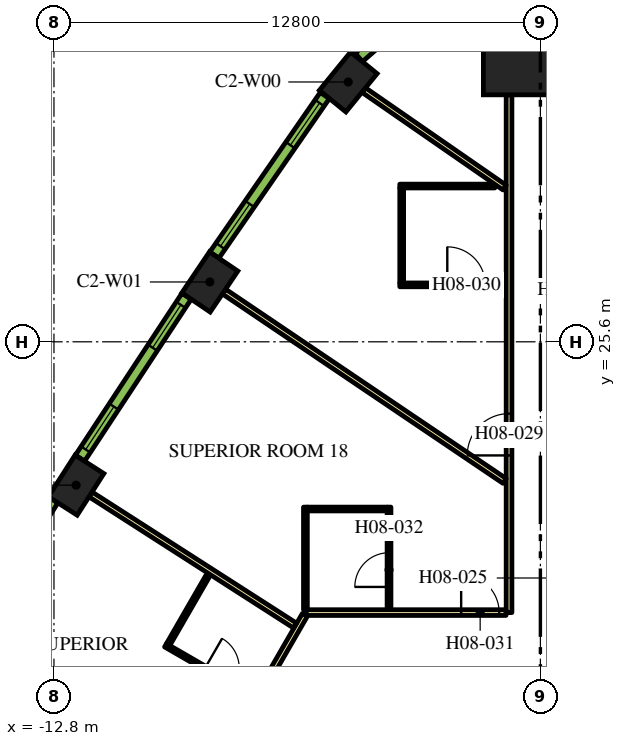
"""IFC4 building model, lengths in metres.
Left out: names, types, materials, properties, quantities, classifications, styles, units other than length and angle.
Written with IfcOpenShell. Run it as: python <this file> out.ifc"""

import sys

from ifc_helpers import new_model, si_unit, direction, frame, frame_2d, origin, origin_2d, place, context, subcontext, project, spatial, rectangle, extrude, element, fill, save


model = new_model("IFC4")
c1 = context("Model", 3, precision=1e-05, world=origin(), true_north=direction((0.0, 1.0)))
c2 = subcontext(c1, "Body", "Model", "MODEL_VIEW")
j1 = project(units=[si_unit("LENGTHUNIT", "METRE"), si_unit("PLANEANGLEUNIT", "RADIAN")], contexts=[c1])
p1 = place(None, origin())
s1 = spatial("IfcSite", under=j1, at=p1, CompositionType="ELEMENT")
p2 = place(p1, origin())
s2 = spatial("IfcBuilding", under=s1, at=p2, CompositionType="ELEMENT")
p3 = place(p2, frame((0.0, 0.0, 107.1)))
s3 = spatial("IfcBuildingStorey", under=s2, at=p3, CompositionType="ELEMENT", Elevation=107.1)
p4 = place(p3, frame((0.0, 33.598, 0.0), z_axis=(0.0, 0.0, 1.0), x_axis=(0.0, 1.0, 0.0)))
e1 = element("IfcColumn", 1, at=p4, inside=s3, PredefinedType="COLUMN", context=c2, shape_type="SweptSolid", body=[
    extrude(rectangle(XDim=3.0, YDim=3.0, at=origin_2d()), origin(), (0.0, 0.0, 1.0), 3.9),
])
for number, where, z_axis, x_axis in (
    (2, (-5.056, 32.437, 0.0), (0.0, 0.0, 1.0), (-0.632, -0.775, 0.0)),
    (3, (-8.699, 27.174, 0.0), (0.0, 0.0, 1.0), (-0.559, -0.829, 0.0)),
    (4, (-12.217, 21.828, 0.0), (0.0, 0.0, 1.0), (-0.54, -0.842, 0.0)),
):
    element("IfcColumn", number, at=place(p3, frame(where, z_axis=z_axis, x_axis=x_axis)), inside=s3, PredefinedType="COLUMN", context=c2, shape_type="SweptSolid", body=[
        extrude(rectangle(XDim=1.3, YDim=0.9, at=origin_2d()), origin(), (0.0, 0.0, 1.0), 3.9),
    ])
p5 = place(p3, frame((-0.825, 18.475, 0.0), z_axis=(0.0, 0.0, 1.0), x_axis=(0.0, 1.0, 0.0)))
e5 = element("IfcWall", 5, at=p5, inside=s3, PredefinedType="PARTITIONING", context=c2, shape_type="SweptSolid", body=[
    extrude(rectangle(XDim=13.623, YDim=0.15, at=frame_2d((6.812, 0.0))), origin(), (0.0, 0.0, 1.0), 2.75),
])
p6 = place(p5, frame((4.135, 0.0, 0.0)))
e6 = element("IfcOpeningElement", 6, at=p6, cuts=e5, PredefinedType="OPENING", context=c2, shape_type="SweptSolid", body=[
    extrude(rectangle(XDim=1.1, YDim=2.1, at=frame_2d((0.55, 1.05))), frame((0.0, 0.085, 0.0), z_axis=(0.0, -1.0, 0.0), x_axis=(1.0, 0.0, 0.0)), (0.0, 0.0, 1.0), 0.17),
])
p7 = place(p3, frame((-6.163, 18.475, 0.0), z_axis=(0.0, 0.0, 1.0), x_axis=(1.0, 0.0, 0.0)))
e7 = element("IfcWall", 7, at=p7, inside=s3, PredefinedType="PARTITIONING", context=c2, shape_type="SweptSolid", body=[
    extrude(rectangle(XDim=5.258, YDim=0.15, at=frame_2d((2.629, 0.0))), origin(), (0.0, 0.0, 1.0), 2.75),
])
p8 = place(p7, frame((4.078, 0.0, 0.0)))
e8 = element("IfcOpeningElement", 8, at=p8, cuts=e7, PredefinedType="OPENING", context=c2, shape_type="SweptSolid", body=[
    extrude(rectangle(XDim=1.0, YDim=2.1, at=frame_2d((0.5, 1.05))), frame((0.0, 0.085, 0.0), z_axis=(0.0, -1.0, 0.0), x_axis=(1.0, 0.0, 0.0)), (0.0, 0.0, 1.0), 0.17),
])
p9 = place(p3, frame((-19.081, -3.9, 0.0), z_axis=(0.0, 0.0, 1.0), x_axis=(0.499998313975, 0.866026377209, 0.0)))
e9 = element("IfcWall", 9, at=p9, inside=s3, PredefinedType="PARTITIONING", context=c2, shape_type="SweptSolid", body=[
    extrude(rectangle(XDim=25.766, YDim=0.15, at=frame_2d((12.883, 0.0))), origin(), (0.0, 0.0, 1.0), 2.75),
])
p10 = place(p9, frame((19.306, 0.0, 0.0)))
e10 = element("IfcOpeningElement", 10, at=p10, cuts=e9, PredefinedType="OPENING", context=c2, shape_type="SweptSolid", body=[
    extrude(rectangle(XDim=1.0, YDim=2.1, at=frame_2d((0.5, 1.05))), frame((0.0, 0.085, 0.0), z_axis=(0.0, -1.0, 0.0), x_axis=(1.0, 0.0, 0.0)), (0.0, 0.0, 1.0), 0.17),
])
p11 = place(p9, frame((18.0, 0.0, 0.0)))
e11 = element("IfcOpeningElement", 11, at=p11, cuts=e9, PredefinedType="OPENING", context=c2, shape_type="SweptSolid", body=[
    extrude(rectangle(XDim=1.0, YDim=2.1, at=frame_2d((0.5, 1.05))), frame((0.0, 0.085, 0.0), z_axis=(0.0, -1.0, 0.0), x_axis=(1.0, 0.0, 0.0)), (0.0, 0.0, 1.0), 0.17),
])
p12 = place(p9, frame((6.838, 0.0, 0.0)))
e12 = element("IfcOpeningElement", 12, at=p12, cuts=e9, PredefinedType="OPENING", context=c2, shape_type="SweptSolid", body=[
    extrude(rectangle(XDim=1.0, YDim=2.1, at=frame_2d((0.5, 1.05))), frame((0.0, 0.085, 0.0), z_axis=(0.0, -1.0, 0.0), x_axis=(1.0, 0.0, 0.0)), (0.0, 0.0, 1.0), 0.17),
])
p13 = place(p9, frame((4.674, 0.0, 0.0)))
e13 = element("IfcOpeningElement", 13, at=p13, cuts=e9, PredefinedType="OPENING", context=c2, shape_type="SweptSolid", body=[
    extrude(rectangle(XDim=0.9, YDim=2.1, at=frame_2d((0.45, 1.05))), frame((0.0, 0.085, 0.0), z_axis=(0.0, -1.0, 0.0), x_axis=(1.0, 0.0, 0.0)), (0.0, 0.0, 1.0), 0.17),
])
p14 = place(p9, frame((0.18, 0.0, 0.0)))
e14 = element("IfcOpeningElement", 14, at=p14, cuts=e9, PredefinedType="OPENING", context=c2, shape_type="SweptSolid", body=[
    extrude(rectangle(XDim=1.0, YDim=2.1, at=frame_2d((0.5, 1.05))), frame((0.0, 0.085, 0.0), z_axis=(0.0, -1.0, 0.0), x_axis=(1.0, 0.0, 0.0)), (0.0, 0.0, 1.0), 0.17),
])
p15 = place(p3, frame((-11.838, 21.585, 0.0), z_axis=(0.0, 0.0, 1.0), x_axis=(0.841699322813, -0.539946525108, 0.0)))
e15 = element("IfcWall", 15, at=p15, inside=s3, PredefinedType="PARTITIONING", context=c2, shape_type="SweptSolid", body=[
    extrude(rectangle(XDim=6.392, YDim=0.15, at=frame_2d((3.196, 0.0))), origin(), (0.0, 0.0, 1.0), 2.75),
])
p16 = place(p3, frame((-8.326, 26.923, 0.0), z_axis=(0.0, 0.0, 1.0), x_axis=(0.828836601893, -0.5594907393, 0.0)))
e16 = element("IfcWall", 16, at=p16, inside=s3, PredefinedType="PARTITIONING", context=c2, shape_type="SweptSolid", body=[
    extrude(rectangle(XDim=8.909, YDim=0.15, at=frame_2d((4.455, 0.0))), origin(), (0.0, 0.0, 1.0), 2.75),
])
p17 = place(p3, frame((-4.649, 32.223, 0.0), z_axis=(0.0, 0.0, 1.0), x_axis=(0.822262349475, -0.569108626394, 0.0)))
e17 = element("IfcWall", 17, at=p17, inside=s3, PredefinedType="PARTITIONING", context=c2, shape_type="SweptSolid", body=[
    extrude(rectangle(XDim=4.51, YDim=0.15, at=frame_2d((2.255, 0.0))), origin(), (0.0, 0.0, 1.0), 2.75),
])
p18 = place(p3, frame((-3.7, 27.098, 0.0), z_axis=(0.0, 0.0, 1.0), x_axis=(1.0, 0.0, 0.0)))
e18 = element("IfcWall", 18, at=p18, inside=s3, PredefinedType="PARTITIONING", context=c2, shape_type="SweptSolid", body=[
    extrude(rectangle(XDim=2.8, YDim=0.1, at=frame_2d((1.4, 0.0))), origin(), (0.0, 0.0, 1.0), 2.75),
])
p19 = place(p18, frame((1.25, 0.0, 0.0)))
e19 = element("IfcOpeningElement", 19, at=p19, cuts=e18, PredefinedType="OPENING", context=c2, shape_type="SweptSolid", body=[
    extrude(rectangle(XDim=1.0, YDim=2.1, at=frame_2d((0.5, 1.05))), frame((0.0, 0.06, 0.0), z_axis=(0.0, -1.0, 0.0), x_axis=(1.0, 0.0, 0.0)), (0.0, 0.0, 1.0), 0.12),
])
for number, where, z_axis, x_axis in (
    (20, (-3.65, 27.148, 0.0), (0.0, 0.0, 1.0), (0.0, 1.0, 0.0)),
    (21, (-1.2, 29.698, 0.0), (0.0, 0.0, 1.0), (-1.0, 0.0, 0.0)),
):
    element("IfcWall", number, at=place(p3, frame(where, z_axis=z_axis, x_axis=x_axis)), inside=s3, PredefinedType="PARTITIONING", context=c2, shape_type="SweptSolid", body=[
        extrude(rectangle(XDim=2.5, YDim=0.1, at=frame_2d((1.25, 0.0))), origin(), (0.0, 0.0, 1.0), 2.75),
    ])
p20 = place(p3, frame((-3.983, 18.55, 0.0), z_axis=(0.0, 0.0, 1.0), x_axis=(0.0, 1.0, 0.0)))
e22 = element("IfcWall", 22, at=p20, inside=s3, PredefinedType="PARTITIONING", context=c2, shape_type="SweptSolid", body=[
    extrude(rectangle(XDim=2.7, YDim=0.1, at=frame_2d((1.35, 0.0))), origin(), (0.0, 0.0, 1.0), 2.75),
])
p21 = place(p20, frame((0.6, 0.0, 0.0)))
e23 = element("IfcOpeningElement", 23, at=p21, cuts=e22, PredefinedType="OPENING", context=c2, shape_type="SweptSolid", body=[
    extrude(rectangle(XDim=0.9, YDim=2.1, at=frame_2d((0.45, 1.05))), frame((0.0, 0.06, 0.0), z_axis=(0.0, -1.0, 0.0), x_axis=(1.0, 0.0, 0.0)), (0.0, 0.0, 1.0), 0.12),
])
p22 = place(p3, frame((-4.033, 21.2, 0.0), z_axis=(0.0, 0.0, 1.0), x_axis=(-1.0, 0.0, 0.0)))
e24 = element("IfcWall", 24, at=p22, inside=s3, PredefinedType="PARTITIONING", context=c2, shape_type="SweptSolid", body=[
    extrude(rectangle(XDim=2.1, YDim=0.1, at=frame_2d((1.05, 0.0))), origin(), (0.0, 0.0, 1.0), 2.75),
])
p23 = place(p3, frame((-6.183, 18.55, 0.0), z_axis=(0.0, 0.0, 1.0), x_axis=(0.0, 1.0, 0.0)))
e25 = element("IfcWall", 25, at=p23, inside=s3, PredefinedType="PARTITIONING", context=c2, shape_type="SweptSolid", body=[
    extrude(rectangle(XDim=2.7, YDim=0.1, at=frame_2d((1.35, 0.0))), origin(), (0.0, 0.0, 1.0), 2.75),
])
p24 = place(p3, frame((-9.864, 17.615, 0.0), z_axis=(0.0, 0.0, 1.0), x_axis=(0.866019956843, -0.50000943426, 0.0)))
e26 = element("IfcWall", 26, at=p24, inside=s3, PredefinedType="PARTITIONING", context=c2, shape_type="SweptSolid", body=[
    extrude(rectangle(XDim=2.7, YDim=0.1, at=frame_2d((1.35, 0.0))), origin(), (0.0, 0.0, 1.0), 2.75),
])
p25 = place(p24, frame((1.2, 0.0, 0.0)))
e27 = element("IfcOpeningElement", 27, at=p25, cuts=e26, PredefinedType="OPENING", context=c2, shape_type="SweptSolid", body=[
    extrude(rectangle(XDim=0.9, YDim=2.1, at=frame_2d((0.45, 1.05))), frame((0.0, 0.06, 0.0), z_axis=(0.0, -1.0, 0.0), x_axis=(1.0, 0.0, 0.0)), (0.0, 0.0, 1.0), 0.12),
])
p26 = place(p3, frame((-9.796, 17.633, 0.0), z_axis=(0.0, 0.0, 1.0), x_axis=(0.499961633463, 0.866047553582, 0.0)))
e28 = element("IfcWall", 28, at=p26, inside=s3, PredefinedType="PARTITIONING", context=c2, shape_type="SweptSolid", body=[
    extrude(rectangle(XDim=2.15, YDim=0.1, at=frame_2d((1.075, 0.0))), origin(), (0.0, 0.0, 1.0), 2.75),
])
p27 = place(p3, frame((-3.405, 34.275, 0.0), z_axis=(0.0, 0.0, 1.0), x_axis=(-0.754882764627, -0.655859749999, 0.0)))
e29 = element("IfcWall", 29, at=p27, inside=s3, PredefinedType="SOLIDWALL", context=c2, shape_type="SweptSolid", body=[
    extrude(rectangle(XDim=1.82, YDim=0.29, at=frame_2d((0.91, 0.0))), origin(), (0.0, 0.0, 1.0), 3.65),
])
p28 = place(p27, frame((0.46, 0.0, 0.9)))
e30 = element("IfcOpeningElement", 30, at=p28, cuts=e29, PredefinedType="OPENING", context=c2, shape_type="SweptSolid", body=[
    extrude(rectangle(XDim=0.9, YDim=2.15, at=frame_2d((0.45, 1.075))), frame((0.0, 0.155, 0.0), z_axis=(0.0, -1.0, 0.0), x_axis=(1.0, 0.0, 0.0)), (0.0, 0.0, 1.0), 0.31),
])
p29 = place(p3, frame((-5.673, 32.081, 0.0), z_axis=(0.0, 0.0, 1.0), x_axis=(-0.569113019126, -0.822259309136, 0.0)))
e31 = element("IfcWall", 31, at=p29, inside=s3, PredefinedType="SOLIDWALL", context=c2, shape_type="SweptSolid", body=[
    extrude(rectangle(XDim=5.107, YDim=0.29, at=frame_2d((2.553, 0.0))), origin(), (0.0, 0.0, 1.0), 3.65),
])
p30 = place(p29, frame((0.24, 0.0, 0.9)))
e32 = element("IfcOpeningElement", 32, at=p30, cuts=e31, PredefinedType="OPENING", context=c2, shape_type="SweptSolid", body=[
    extrude(rectangle(XDim=1.35, YDim=2.15, at=frame_2d((0.675, 1.075))), frame((0.0, 0.155, 0.0), z_axis=(0.0, -1.0, 0.0), x_axis=(1.0, 0.0, 0.0)), (0.0, 0.0, 1.0), 0.31),
])
p31 = place(p29, frame((3.471, 0.0, 0.9)))
e33 = element("IfcOpeningElement", 33, at=p31, cuts=e31, PredefinedType="OPENING", context=c2, shape_type="SweptSolid", body=[
    extrude(rectangle(XDim=1.35, YDim=2.15, at=frame_2d((0.675, 1.075))), frame((0.0, 0.155, 0.0), z_axis=(0.0, -1.0, 0.0), x_axis=(1.0, 0.0, 0.0)), (0.0, 0.0, 1.0), 0.31),
])
p32 = place(p3, frame((-9.311, 26.799, 0.0), z_axis=(0.0, 0.0, 1.0), x_axis=(-0.549741341923, -0.835334937005, 0.0)))
e34 = element("IfcWall", 34, at=p32, inside=s3, PredefinedType="SOLIDWALL", context=c2, shape_type="SweptSolid", body=[
    extrude(rectangle(XDim=5.1, YDim=0.29, at=frame_2d((2.55, 0.0))), origin(), (0.0, 0.0, 1.0), 3.65),
])
p33 = place(p32, frame((0.273, 0.0, 0.9)))
e35 = element("IfcOpeningElement", 35, at=p33, cuts=e34, PredefinedType="OPENING", context=c2, shape_type="SweptSolid", body=[
    extrude(rectangle(XDim=1.35, YDim=2.15, at=frame_2d((0.675, 1.075))), frame((0.0, 0.155, 0.0), z_axis=(0.0, -1.0, 0.0), x_axis=(1.0, 0.0, 0.0)), (0.0, 0.0, 1.0), 0.31),
])
p34 = place(p32, frame((3.478, 0.0, 0.9)))
e36 = element("IfcOpeningElement", 36, at=p34, cuts=e34, PredefinedType="OPENING", context=c2, shape_type="SweptSolid", body=[
    extrude(rectangle(XDim=1.35, YDim=2.15, at=frame_2d((0.675, 1.075))), frame((0.0, 0.155, 0.0), z_axis=(0.0, -1.0, 0.0), x_axis=(1.0, 0.0, 0.0)), (0.0, 0.0, 1.0), 0.31),
])
p35 = place(p3, frame((-12.82, 21.439, 0.0), z_axis=(0.0, 0.0, 1.0), x_axis=(-0.530072082134, -0.847952585787, 0.0)))
e37 = element("IfcWall", 37, at=p35, inside=s3, PredefinedType="SOLIDWALL", context=c2, shape_type="SweptSolid", body=[
    extrude(rectangle(XDim=5.1, YDim=0.29, at=frame_2d((2.55, 0.0))), origin(), (0.0, 0.0, 1.0), 3.65),
])
p36 = place(p35, frame((0.273, 0.0, 0.9)))
e38 = element("IfcOpeningElement", 38, at=p36, cuts=e37, PredefinedType="OPENING", context=c2, shape_type="SweptSolid", body=[
    extrude(rectangle(XDim=1.35, YDim=2.15, at=frame_2d((0.675, 1.075))), frame((0.0, 0.155, 0.0), z_axis=(0.0, -1.0, 0.0), x_axis=(1.0, 0.0, 0.0)), (0.0, 0.0, 1.0), 0.31),
])
p37 = place(p35, frame((3.478, 0.0, 0.9)))
e39 = element("IfcOpeningElement", 39, at=p37, cuts=e37, PredefinedType="OPENING", context=c2, shape_type="SweptSolid", body=[
    extrude(rectangle(XDim=1.35, YDim=2.15, at=frame_2d((0.675, 1.075))), frame((0.0, 0.155, 0.0), z_axis=(0.0, -1.0, 0.0), x_axis=(1.0, 0.0, 0.0)), (0.0, 0.0, 1.0), 0.31),
])
p38 = place(p6, origin())
e40 = element("IfcDoor", 40, at=p38, inside=s3, OperationType="SINGLE_SWING_LEFT", PredefinedType="DOOR", context=c2, shape_type="SweptSolid", body=[
    extrude(rectangle(XDim=1.1, YDim=2.1, at=frame_2d((0.55, 1.05))), frame((0.0, 0.025, 0.0), z_axis=(0.0, -1.0, 0.0), x_axis=(1.0, 0.0, 0.0)), (0.0, 0.0, 1.0), 0.05),
])
fill(e6, e40)
p39 = place(p19, origin())
e41 = element("IfcDoor", 41, at=p39, inside=s3, OperationType="SINGLE_SWING_LEFT", PredefinedType="DOOR", context=c2, shape_type="SweptSolid", body=[
    extrude(rectangle(XDim=1.0, YDim=2.1, at=frame_2d((0.5, 1.05))), frame((0.0, 0.025, 0.0), z_axis=(0.0, -1.0, 0.0), x_axis=(1.0, 0.0, 0.0)), (0.0, 0.0, 1.0), 0.05),
])
fill(e19, e41)
p40 = place(p8, origin())
e42 = element("IfcDoor", 42, at=p40, inside=s3, OperationType="SINGLE_SWING_RIGHT", PredefinedType="DOOR", context=c2, shape_type="SweptSolid", body=[
    extrude(rectangle(XDim=1.0, YDim=2.1, at=frame_2d((0.5, 1.05))), frame((0.0, 0.025, 0.0), z_axis=(0.0, -1.0, 0.0), x_axis=(1.0, 0.0, 0.0)), (0.0, 0.0, 1.0), 0.05),
])
fill(e8, e42)
p41 = place(p21, origin())
e43 = element("IfcDoor", 43, at=p41, inside=s3, OperationType="SINGLE_SWING_RIGHT", PredefinedType="DOOR", context=c2, shape_type="SweptSolid", body=[
    extrude(rectangle(XDim=0.9, YDim=2.1, at=frame_2d((0.45, 1.05))), frame((0.0, 0.025, 0.0), z_axis=(0.0, -1.0, 0.0), x_axis=(1.0, 0.0, 0.0)), (0.0, 0.0, 1.0), 0.05),
])
fill(e23, e43)
p42 = place(p30, origin())
e44 = element("IfcWindow", 44, at=p42, inside=s3, PartitioningType="DOUBLE_PANEL_VERTICAL", PredefinedType="WINDOW", context=c2, shape_type="SweptSolid", body=[
    extrude(rectangle(XDim=1.35, YDim=2.15, at=frame_2d((0.675, 1.075))), frame((0.0, 0.015, 0.0), z_axis=(0.0, -1.0, 0.0), x_axis=(1.0, 0.0, 0.0)), (0.0, 0.0, 1.0), 0.06),
])
fill(e32, e44)
p43 = place(p31, origin())
e45 = element("IfcWindow", 45, at=p43, inside=s3, PartitioningType="DOUBLE_PANEL_VERTICAL", PredefinedType="WINDOW", context=c2, shape_type="SweptSolid", body=[
    extrude(rectangle(XDim=1.35, YDim=2.15, at=frame_2d((0.675, 1.075))), frame((0.0, 0.015, 0.0), z_axis=(0.0, -1.0, 0.0), x_axis=(1.0, 0.0, 0.0)), (0.0, 0.0, 1.0), 0.06),
])
fill(e33, e45)
p44 = place(p33, origin())
e46 = element("IfcWindow", 46, at=p44, inside=s3, PartitioningType="DOUBLE_PANEL_VERTICAL", PredefinedType="WINDOW", context=c2, shape_type="SweptSolid", body=[
    extrude(rectangle(XDim=1.35, YDim=2.15, at=frame_2d((0.675, 1.075))), frame((0.0, 0.015, 0.0), z_axis=(0.0, -1.0, 0.0), x_axis=(1.0, 0.0, 0.0)), (0.0, 0.0, 1.0), 0.06),
])
fill(e35, e46)
p45 = place(p34, origin())
e47 = element("IfcWindow", 47, at=p45, inside=s3, PartitioningType="DOUBLE_PANEL_VERTICAL", PredefinedType="WINDOW", context=c2, shape_type="SweptSolid", body=[
    extrude(rectangle(XDim=1.35, YDim=2.15, at=frame_2d((0.675, 1.075))), frame((0.0, 0.015, 0.0), z_axis=(0.0, -1.0, 0.0), x_axis=(1.0, 0.0, 0.0)), (0.0, 0.0, 1.0), 0.06),
])
fill(e36, e47)
save(model, sys.argv[1])
